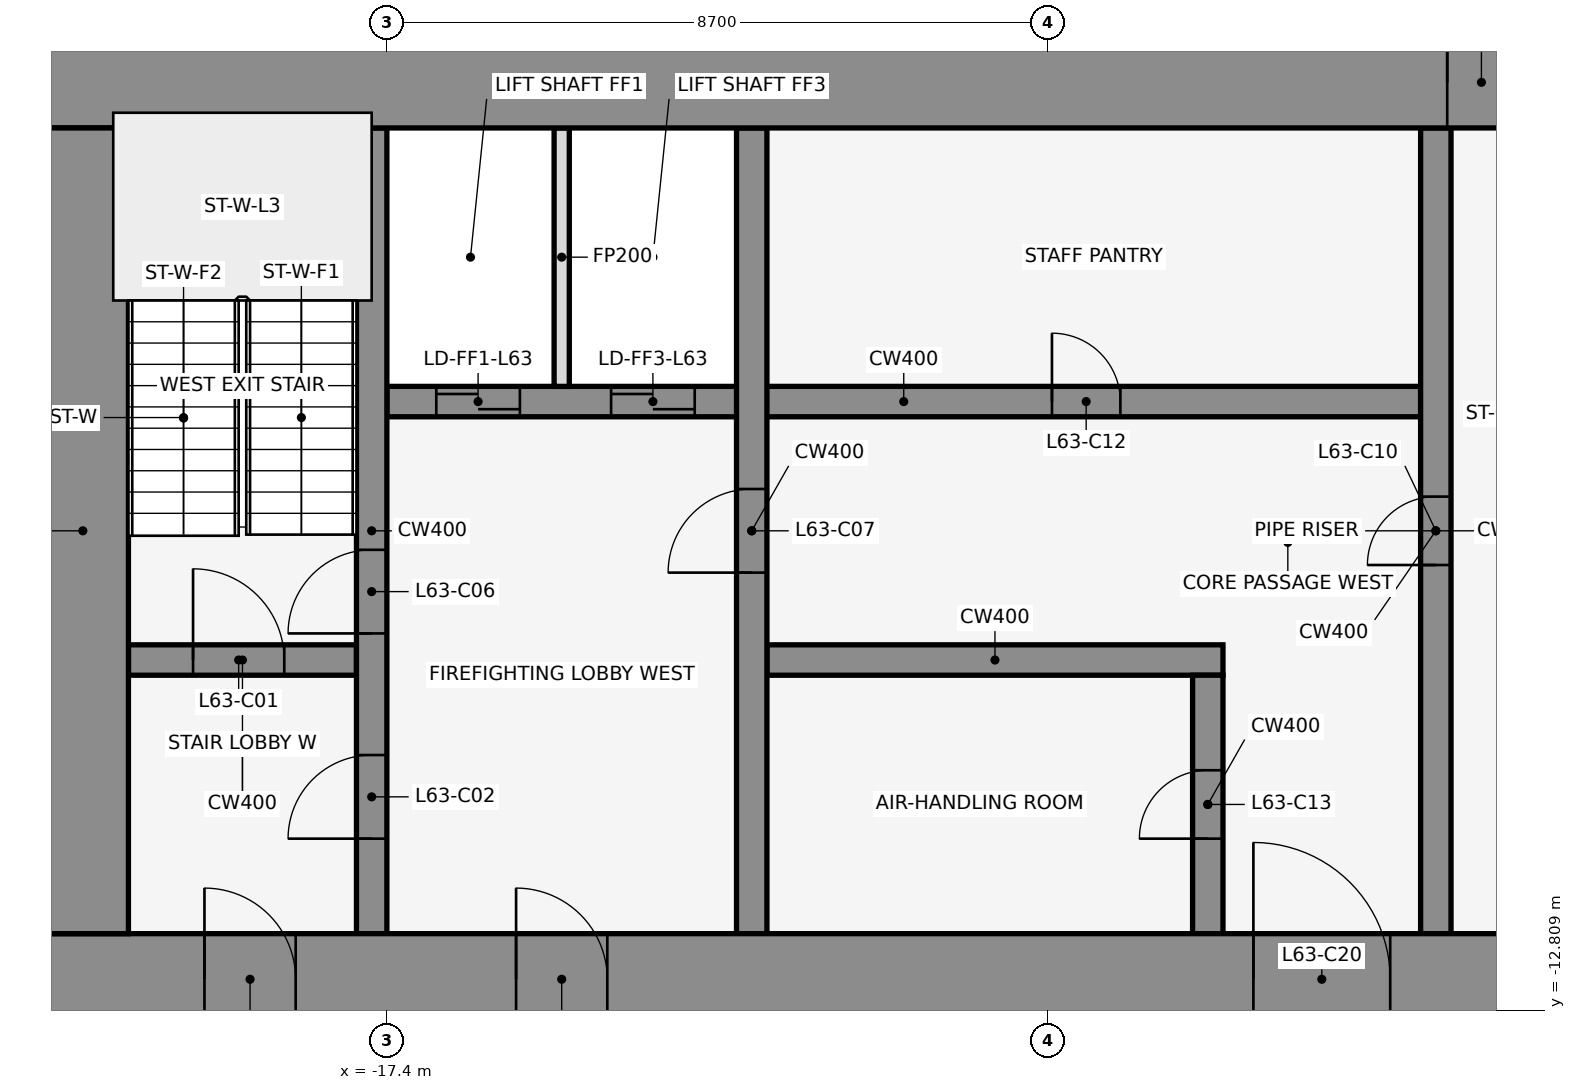
"""IFC4 building model, lengths in metres.
Left out: names, types, materials, properties, quantities, classifications, styles, units other than length and angle.
Written with IfcOpenShell. Run it as: python <this file> out.ifc"""

import sys

from ifc_helpers import new_model, si_unit, direction, frame, frame_2d, origin, place, context, subcontext, project, spatial, rectangle, extrude, element, fill, save


model = new_model("IFC4")
c1 = context("Model", 3, precision=1e-05, world=origin(), true_north=direction((0.0, 1.0)))
c2 = subcontext(c1, "Body", "Model", "MODEL_VIEW")
j1 = project(units=[si_unit("LENGTHUNIT", "METRE"), si_unit("PLANEANGLEUNIT", "RADIAN")], contexts=[c1])
p1 = place(None, origin())
s1 = spatial("IfcSite", under=j1, at=p1, CompositionType="ELEMENT")
p2 = place(p1, origin())
s2 = spatial("IfcBuilding", under=s1, at=p2, CompositionType="ELEMENT")
p3 = place(p2, frame((0.0, 0.0, 279.2)))
s3 = spatial("IfcBuildingStorey", under=s2, at=p3, CompositionType="ELEMENT", Elevation=279.2)
p4 = place(p3, frame((-14.599, 1.08, 0.0), z_axis=(0.0, 0.0, 1.0), x_axis=(-0.83981312244, -0.542875602121, 0.0)))
e1 = element("IfcWall", 1, at=p4, inside=s3, PredefinedType="STANDARD", context=c2, shape_type="SweptSolid", body=[
    extrude(rectangle(XDim=2.183, YDim=0.25, at=frame_2d((1.091, 0.0))), origin(), (0.0, 0.0, 1.0), 4.05),
])
p5 = place(p3, frame((-20.8, -8.2, 0.0), z_axis=(0.0, 0.0, 1.0), x_axis=(1.0, 0.0, 0.0)))
e2 = element("IfcWall", 2, at=p5, inside=s3, PredefinedType="SHEAR", context=c2, shape_type="SweptSolid", body=[
    extrude(rectangle(XDim=3.0, YDim=0.4, at=frame_2d((1.5, 0.0))), origin(), (0.0, 0.0, 1.0), 4.2),
])
p6 = place(p5, frame((0.85, 0.0, 0.0)))
e3 = element("IfcOpeningElement", 3, at=p6, cuts=e2, PredefinedType="OPENING", context=c2, shape_type="SweptSolid", body=[
    extrude(rectangle(XDim=1.2, YDim=2.1, at=frame_2d((0.6, 1.05))), frame((0.0, 0.212, 0.0), z_axis=(0.0, -1.0, 0.0), x_axis=(1.0, 0.0, 0.0)), (0.0, 0.0, 1.0), 0.424),
])
p7 = place(p3, frame((-12.4, -8.2, 0.0), z_axis=(0.0, 0.0, 1.0), x_axis=(1.0, 0.0, 0.0)))
e4 = element("IfcWall", 4, at=p7, inside=s3, PredefinedType="SHEAR", context=c2, shape_type="SweptSolid", body=[
    extrude(rectangle(XDim=6.0, YDim=0.4, at=frame_2d((3.0, 0.0))), origin(), (0.0, 0.0, 1.0), 4.2),
])
p8 = place(p3, frame((-17.4, -4.8, 0.0), z_axis=(0.0, 0.0, 1.0), x_axis=(1.0, 0.0, 0.0)))
e5 = element("IfcWall", 5, at=p8, inside=s3, PredefinedType="SHEAR", context=c2, shape_type="SweptSolid", body=[
    extrude(rectangle(XDim=13.6, YDim=0.4, at=frame_2d((6.8, 0.0))), origin(), (0.0, 0.0, 1.0), 4.2),
])
p9 = place(p8, frame((0.65, 0.0, 0.0)))
e6 = element("IfcOpeningElement", 6, at=p9, cuts=e5, PredefinedType="OPENING", context=c2, shape_type="SweptSolid", body=[
    extrude(rectangle(XDim=1.1, YDim=2.1, at=frame_2d((0.55, 1.05))), frame((0.0, 0.212, 0.0), z_axis=(0.0, -1.0, 0.0), x_axis=(1.0, 0.0, 0.0)), (0.0, 0.0, 1.0), 0.424),
])
p10 = place(p8, frame((2.95, 0.0, 0.0)))
e7 = element("IfcOpeningElement", 7, at=p10, cuts=e5, PredefinedType="OPENING", context=c2, shape_type="SweptSolid", body=[
    extrude(rectangle(XDim=1.1, YDim=2.1, at=frame_2d((0.55, 1.05))), frame((0.0, 0.212, 0.0), z_axis=(0.0, -1.0, 0.0), x_axis=(1.0, 0.0, 0.0)), (0.0, 0.0, 1.0), 0.424),
])
p11 = place(p8, frame((8.75, 0.0, 0.0)))
e8 = element("IfcOpeningElement", 8, at=p11, cuts=e5, PredefinedType="OPENING", context=c2, shape_type="SweptSolid", body=[
    extrude(rectangle(XDim=0.9, YDim=2.1, at=frame_2d((0.45, 1.05))), frame((0.0, 0.212, 0.0), z_axis=(0.0, -1.0, 0.0), x_axis=(1.0, 0.0, 0.0)), (0.0, 0.0, 1.0), 0.424),
])
p12 = place(p3, frame((-17.6, -11.8, 0.0), z_axis=(0.0, 0.0, 1.0), x_axis=(0.0, 1.0, 0.0)))
e9 = element("IfcWall", 9, at=p12, inside=s3, PredefinedType="SHEAR", context=c2, shape_type="SweptSolid", body=[
    extrude(rectangle(XDim=10.6, YDim=0.4, at=frame_2d((5.3, 0.0))), origin(), (0.0, 0.0, 1.0), 4.2),
])
p13 = place(p12, frame((1.25, 0.0, 0.0)))
e10 = element("IfcOpeningElement", 10, at=p13, cuts=e9, PredefinedType="OPENING", context=c2, shape_type="SweptSolid", body=[
    extrude(rectangle(XDim=1.1, YDim=2.1, at=frame_2d((0.55, 1.05))), frame((0.0, 0.212, 0.0), z_axis=(0.0, -1.0, 0.0), x_axis=(1.0, 0.0, 0.0)), (0.0, 0.0, 1.0), 0.424),
])
p14 = place(p12, frame((3.95, 0.0, 0.0)))
e11 = element("IfcOpeningElement", 11, at=p14, cuts=e9, PredefinedType="OPENING", context=c2, shape_type="SweptSolid", body=[
    extrude(rectangle(XDim=1.1, YDim=2.1, at=frame_2d((0.55, 1.05))), frame((0.0, 0.212, 0.0), z_axis=(0.0, -1.0, 0.0), x_axis=(1.0, 0.0, 0.0)), (0.0, 0.0, 1.0), 0.424),
])
p15 = place(p3, frame((-15.1, -4.6, 0.0), z_axis=(0.0, 0.0, 1.0), x_axis=(0.0, 1.0, 0.0)))
e12 = element("IfcWall", 12, at=p15, inside=s3, PredefinedType="PARTITIONING", context=c2, shape_type="SweptSolid", body=[
    extrude(rectangle(XDim=3.4, YDim=0.2, at=frame_2d((1.7, 0.0))), origin(), (0.0, 0.0, 1.0), 3.04),
])
p16 = place(p3, frame((-12.6, -11.8, 0.0), z_axis=(0.0, 0.0, 1.0), x_axis=(0.0, 1.0, 0.0)))
e13 = element("IfcWall", 13, at=p16, inside=s3, PredefinedType="SHEAR", context=c2, shape_type="SweptSolid", body=[
    extrude(rectangle(XDim=10.6, YDim=0.4, at=frame_2d((5.3, 0.0))), origin(), (0.0, 0.0, 1.0), 4.2),
])
p17 = place(p16, frame((4.75, 0.0, 0.0)))
e14 = element("IfcOpeningElement", 14, at=p17, cuts=e13, PredefinedType="OPENING", context=c2, shape_type="SweptSolid", body=[
    extrude(rectangle(XDim=1.1, YDim=2.1, at=frame_2d((0.55, 1.05))), frame((0.0, 0.212, 0.0), z_axis=(0.0, -1.0, 0.0), x_axis=(1.0, 0.0, 0.0)), (0.0, 0.0, 1.0), 0.424),
])
p18 = place(p3, frame((-6.6, -11.8, 0.0), z_axis=(0.0, 0.0, 1.0), x_axis=(0.0, 1.0, 0.0)))
e15 = element("IfcWall", 15, at=p18, inside=s3, PredefinedType="SHEAR", context=c2, shape_type="SweptSolid", body=[
    extrude(rectangle(XDim=3.4, YDim=0.4, at=frame_2d((1.7, 0.0))), origin(), (0.0, 0.0, 1.0), 4.2),
])
p19 = place(p18, frame((1.25, 0.0, 0.0)))
e16 = element("IfcOpeningElement", 16, at=p19, cuts=e15, PredefinedType="OPENING", context=c2, shape_type="SweptSolid", body=[
    extrude(rectangle(XDim=0.9, YDim=2.1, at=frame_2d((0.45, 1.05))), frame((0.0, 0.212, 0.0), z_axis=(0.0, -1.0, 0.0), x_axis=(1.0, 0.0, 0.0)), (0.0, 0.0, 1.0), 0.424),
])
p20 = place(p3, frame((-3.6, -11.8, 0.0), z_axis=(0.0, 0.0, 1.0), x_axis=(0.0, 1.0, 0.0)))
e17 = element("IfcWall", 17, at=p20, inside=s3, PredefinedType="SHEAR", context=c2, shape_type="SweptSolid", body=[
    extrude(rectangle(XDim=10.6, YDim=0.4, at=frame_2d((5.3, 0.0))), origin(), (0.0, 0.0, 1.0), 4.2),
])
p21 = place(p20, frame((4.85, 0.0, 0.0)))
e18 = element("IfcOpeningElement", 18, at=p21, cuts=e17, PredefinedType="OPENING", context=c2, shape_type="SweptSolid", body=[
    extrude(rectangle(XDim=0.9, YDim=2.1, at=frame_2d((0.45, 1.05))), frame((0.0, 0.212, 0.0), z_axis=(0.0, -1.0, 0.0), x_axis=(1.0, 0.0, 0.0)), (0.0, 0.0, 1.0), 0.424),
])
p22 = place(p3, frame((-22.0, -0.6, 0.0), z_axis=(0.0, 0.0, 1.0), x_axis=(1.0, 0.0, 0.0)))
e19 = element("IfcWall", 19, at=p22, inside=s3, PredefinedType="SHEAR", context=c2, shape_type="SweptSolid", body=[
    extrude(rectangle(XDim=44.0, YDim=1.2, at=frame_2d((22.0, 0.0))), origin(), (0.0, 0.0, 1.0), 4.2),
])
p23 = place(p22, frame((18.55, 0.0, 0.0)))
e20 = element("IfcOpeningElement", 20, at=p23, cuts=e19, PredefinedType="OPENING", context=c2, shape_type="SweptSolid", body=[
    extrude(rectangle(XDim=0.9, YDim=2.1, at=frame_2d((0.45, 1.05))), frame((0.0, 0.612, 0.0), z_axis=(0.0, -1.0, 0.0), x_axis=(1.0, 0.0, 0.0)), (0.0, 0.0, 1.0), 1.224),
])
p24 = place(p22, frame((24.55, 0.0, 0.0)))
e21 = element("IfcOpeningElement", 21, at=p24, cuts=e19, PredefinedType="OPENING", context=c2, shape_type="SweptSolid", body=[
    extrude(rectangle(XDim=0.9, YDim=2.1, at=frame_2d((0.45, 1.05))), frame((0.0, 0.612, 0.0), z_axis=(0.0, -1.0, 0.0), x_axis=(1.0, 0.0, 0.0)), (0.0, 0.0, 1.0), 1.224),
])
p25 = place(p3, frame((-22.0, -12.4, 0.0), z_axis=(0.0, 0.0, 1.0), x_axis=(1.0, 0.0, 0.0)))
e22 = element("IfcWall", 22, at=p25, inside=s3, PredefinedType="SHEAR", context=c2, shape_type="SweptSolid", body=[
    extrude(rectangle(XDim=44.0, YDim=1.2, at=frame_2d((22.0, 0.0))), origin(), (0.0, 0.0, 1.0), 4.2),
])
p26 = place(p25, frame((2.2, 0.0, 0.0)))
e23 = element("IfcOpeningElement", 23, at=p26, cuts=e22, PredefinedType="OPENING", context=c2, shape_type="SweptSolid", body=[
    extrude(rectangle(XDim=1.2, YDim=2.1, at=frame_2d((0.6, 1.05))), frame((0.0, 0.612, 0.0), z_axis=(0.0, -1.0, 0.0), x_axis=(1.0, 0.0, 0.0)), (0.0, 0.0, 1.0), 1.224),
])
p27 = place(p25, frame((21.4, 0.0, 0.0)))
e24 = element("IfcOpeningElement", 24, at=p27, cuts=e22, PredefinedType="OPENING", context=c2, shape_type="SweptSolid", body=[
    extrude(rectangle(XDim=1.2, YDim=2.1, at=frame_2d((0.6, 1.05))), frame((0.0, 0.612, 0.0), z_axis=(0.0, -1.0, 0.0), x_axis=(1.0, 0.0, 0.0)), (0.0, 0.0, 1.0), 1.224),
])
p28 = place(p25, frame((40.6, 0.0, 0.0)))
e25 = element("IfcOpeningElement", 25, at=p28, cuts=e22, PredefinedType="OPENING", context=c2, shape_type="SweptSolid", body=[
    extrude(rectangle(XDim=1.2, YDim=2.1, at=frame_2d((0.6, 1.05))), frame((0.0, 0.612, 0.0), z_axis=(0.0, -1.0, 0.0), x_axis=(1.0, 0.0, 0.0)), (0.0, 0.0, 1.0), 1.224),
])
p29 = place(p25, frame((16.0, 0.0, 0.0)))
e26 = element("IfcOpeningElement", 26, at=p29, cuts=e22, PredefinedType="OPENING", context=c2, shape_type="SweptSolid", body=[
    extrude(rectangle(XDim=1.8, YDim=2.1, at=frame_2d((0.9, 1.05))), frame((0.0, 0.612, 0.0), z_axis=(0.0, -1.0, 0.0), x_axis=(1.0, 0.0, 0.0)), (0.0, 0.0, 1.0), 1.224),
])
p30 = place(p25, frame((6.3, 0.0, 0.0)))
e27 = element("IfcOpeningElement", 27, at=p30, cuts=e22, PredefinedType="OPENING", context=c2, shape_type="SweptSolid", body=[
    extrude(rectangle(XDim=1.2, YDim=2.1, at=frame_2d((0.6, 1.05))), frame((0.0, 0.612, 0.0), z_axis=(0.0, -1.0, 0.0), x_axis=(1.0, 0.0, 0.0)), (0.0, 0.0, 1.0), 1.224),
])
p31 = place(p25, frame((26.2, 0.0, 0.0)))
e28 = element("IfcOpeningElement", 28, at=p31, cuts=e22, PredefinedType="OPENING", context=c2, shape_type="SweptSolid", body=[
    extrude(rectangle(XDim=1.8, YDim=2.1, at=frame_2d((0.9, 1.05))), frame((0.0, 0.612, 0.0), z_axis=(0.0, -1.0, 0.0), x_axis=(1.0, 0.0, 0.0)), (0.0, 0.0, 1.0), 1.224),
])
p32 = place(p25, frame((36.5, 0.0, 0.0)))
e29 = element("IfcOpeningElement", 29, at=p32, cuts=e22, PredefinedType="OPENING", context=c2, shape_type="SweptSolid", body=[
    extrude(rectangle(XDim=1.2, YDim=2.1, at=frame_2d((0.6, 1.05))), frame((0.0, 0.612, 0.0), z_axis=(0.0, -1.0, 0.0), x_axis=(1.0, 0.0, 0.0)), (0.0, 0.0, 1.0), 1.224),
])
p33 = place(p3, frame((-21.4, -11.8, 0.0), z_axis=(0.0, 0.0, 1.0), x_axis=(0.0, 1.0, 0.0)))
e30 = element("IfcWall", 30, at=p33, inside=s3, PredefinedType="SHEAR", context=c2, shape_type="SweptSolid", body=[
    extrude(rectangle(XDim=10.6, YDim=1.2, at=frame_2d((5.3, 0.0))), origin(), (0.0, 0.0, 1.0), 4.2),
])
p34 = place(p6, origin())
e31 = element("IfcDoor", 31, at=p34, inside=s3, OperationType="SINGLE_SWING_LEFT", PredefinedType="DOOR", context=c2, shape_type="SweptSolid", body=[
    extrude(rectangle(XDim=1.2, YDim=2.1, at=frame_2d((0.6, 1.05))), frame((0.0, 0.025, 0.0), z_axis=(0.0, -1.0, 0.0), x_axis=(1.0, 0.0, 0.0)), (0.0, 0.0, 1.0), 0.05),
])
fill(e3, e31)
p35 = place(p13, frame((1.1, 0.0, 0.0), z_axis=(0.0, 0.0, 1.0), x_axis=(-1.0, 0.0, 0.0)))
e32 = element("IfcDoor", 32, at=p35, inside=s3, OperationType="SINGLE_SWING_LEFT", PredefinedType="DOOR", context=c2, shape_type="SweptSolid", body=[
    extrude(rectangle(XDim=1.1, YDim=2.1, at=frame_2d((0.55, 1.05))), frame((0.0, 0.025, 0.0), z_axis=(0.0, -1.0, 0.0), x_axis=(1.0, 0.0, 0.0)), (0.0, 0.0, 1.0), 0.05),
])
fill(e10, e32)
p36 = place(p9, origin())
e33 = element("IfcDoor", 33, at=p36, inside=s3, OperationType="DOUBLE_DOOR_SLIDING", PredefinedType="DOOR", context=c2, shape_type="SweptSolid", body=[
    extrude(rectangle(XDim=1.1, YDim=2.1, at=frame_2d((0.55, 1.05))), frame((0.0, 0.025, 0.0), z_axis=(0.0, -1.0, 0.0), x_axis=(1.0, 0.0, 0.0)), (0.0, 0.0, 1.0), 0.05),
])
fill(e6, e33)
p37 = place(p10, origin())
e34 = element("IfcDoor", 34, at=p37, inside=s3, OperationType="DOUBLE_DOOR_SLIDING", PredefinedType="DOOR", context=c2, shape_type="SweptSolid", body=[
    extrude(rectangle(XDim=1.1, YDim=2.1, at=frame_2d((0.55, 1.05))), frame((0.0, 0.025, 0.0), z_axis=(0.0, -1.0, 0.0), x_axis=(1.0, 0.0, 0.0)), (0.0, 0.0, 1.0), 0.05),
])
fill(e7, e34)
p38 = place(p14, frame((1.1, 0.0, 0.0), z_axis=(0.0, 0.0, 1.0), x_axis=(-1.0, 0.0, 0.0)))
e35 = element("IfcDoor", 35, at=p38, inside=s3, OperationType="SINGLE_SWING_LEFT", PredefinedType="DOOR", context=c2, shape_type="SweptSolid", body=[
    extrude(rectangle(XDim=1.1, YDim=2.1, at=frame_2d((0.55, 1.05))), frame((0.0, 0.025, 0.0), z_axis=(0.0, -1.0, 0.0), x_axis=(1.0, 0.0, 0.0)), (0.0, 0.0, 1.0), 0.05),
])
fill(e11, e35)
p39 = place(p17, origin())
e36 = element("IfcDoor", 36, at=p39, inside=s3, OperationType="SINGLE_SWING_LEFT", PredefinedType="DOOR", context=c2, shape_type="SweptSolid", body=[
    extrude(rectangle(XDim=1.1, YDim=2.1, at=frame_2d((0.55, 1.05))), frame((0.0, 0.025, 0.0), z_axis=(0.0, -1.0, 0.0), x_axis=(1.0, 0.0, 0.0)), (0.0, 0.0, 1.0), 0.05),
])
fill(e14, e36)
p40 = place(p21, frame((0.9, 0.0, 0.0), z_axis=(0.0, 0.0, 1.0), x_axis=(-1.0, 0.0, 0.0)))
e37 = element("IfcDoor", 37, at=p40, inside=s3, OperationType="SINGLE_SWING_LEFT", PredefinedType="DOOR", context=c2, shape_type="SweptSolid", body=[
    extrude(rectangle(XDim=0.9, YDim=2.1, at=frame_2d((0.45, 1.05))), frame((0.0, 0.025, 0.0), z_axis=(0.0, -1.0, 0.0), x_axis=(1.0, 0.0, 0.0)), (0.0, 0.0, 1.0), 0.05),
])
fill(e18, e37)
p41 = place(p11, origin())
e38 = element("IfcDoor", 38, at=p41, inside=s3, OperationType="SINGLE_SWING_RIGHT", PredefinedType="DOOR", context=c2, shape_type="SweptSolid", body=[
    extrude(rectangle(XDim=0.9, YDim=2.1, at=frame_2d((0.45, 1.05))), frame((0.0, 0.025, 0.0), z_axis=(0.0, -1.0, 0.0), x_axis=(1.0, 0.0, 0.0)), (0.0, 0.0, 1.0), 0.05),
])
fill(e8, e38)
p42 = place(p19, origin())
e39 = element("IfcDoor", 39, at=p42, inside=s3, OperationType="SINGLE_SWING_LEFT", PredefinedType="DOOR", context=c2, shape_type="SweptSolid", body=[
    extrude(rectangle(XDim=0.9, YDim=2.1, at=frame_2d((0.45, 1.05))), frame((0.0, 0.025, 0.0), z_axis=(0.0, -1.0, 0.0), x_axis=(1.0, 0.0, 0.0)), (0.0, 0.0, 1.0), 0.05),
])
fill(e16, e39)
p43 = place(p23, origin())
e40 = element("IfcDoor", 40, at=p43, inside=s3, OperationType="SINGLE_SWING_LEFT", PredefinedType="DOOR", context=c2, shape_type="SweptSolid", body=[
    extrude(rectangle(XDim=0.9, YDim=2.1, at=frame_2d((0.45, 1.05))), frame((0.0, 0.025, 0.0), z_axis=(0.0, -1.0, 0.0), x_axis=(1.0, 0.0, 0.0)), (0.0, 0.0, 1.0), 0.05),
])
fill(e20, e40)
p44 = place(p26, frame((1.2, 0.0, 0.0), z_axis=(0.0, 0.0, 1.0), x_axis=(-1.0, 0.0, 0.0)))
e41 = element("IfcDoor", 41, at=p44, inside=s3, OperationType="SINGLE_SWING_RIGHT", PredefinedType="DOOR", context=c2, shape_type="SweptSolid", body=[
    extrude(rectangle(XDim=1.2, YDim=2.1, at=frame_2d((0.6, 1.05))), frame((0.0, 0.025, 0.0), z_axis=(0.0, -1.0, 0.0), x_axis=(1.0, 0.0, 0.0)), (0.0, 0.0, 1.0), 0.05),
])
fill(e23, e41)
p45 = place(p29, origin())
e42 = element("IfcDoor", 42, at=p45, inside=s3, OperationType="SINGLE_SWING_LEFT", PredefinedType="DOOR", context=c2, shape_type="SweptSolid", body=[
    extrude(rectangle(XDim=1.8, YDim=2.1, at=frame_2d((0.9, 1.05))), frame((0.0, 0.025, 0.0), z_axis=(0.0, -1.0, 0.0), x_axis=(1.0, 0.0, 0.0)), (0.0, 0.0, 1.0), 0.05),
])
fill(e26, e42)
p46 = place(p30, frame((1.2, 0.0, 0.0), z_axis=(0.0, 0.0, 1.0), x_axis=(-1.0, 0.0, 0.0)))
e43 = element("IfcDoor", 43, at=p46, inside=s3, OperationType="SINGLE_SWING_RIGHT", PredefinedType="DOOR", context=c2, shape_type="SweptSolid", body=[
    extrude(rectangle(XDim=1.2, YDim=2.1, at=frame_2d((0.6, 1.05))), frame((0.0, 0.025, 0.0), z_axis=(0.0, -1.0, 0.0), x_axis=(1.0, 0.0, 0.0)), (0.0, 0.0, 1.0), 0.05),
])
fill(e27, e43)
save(model, sys.argv[1])
